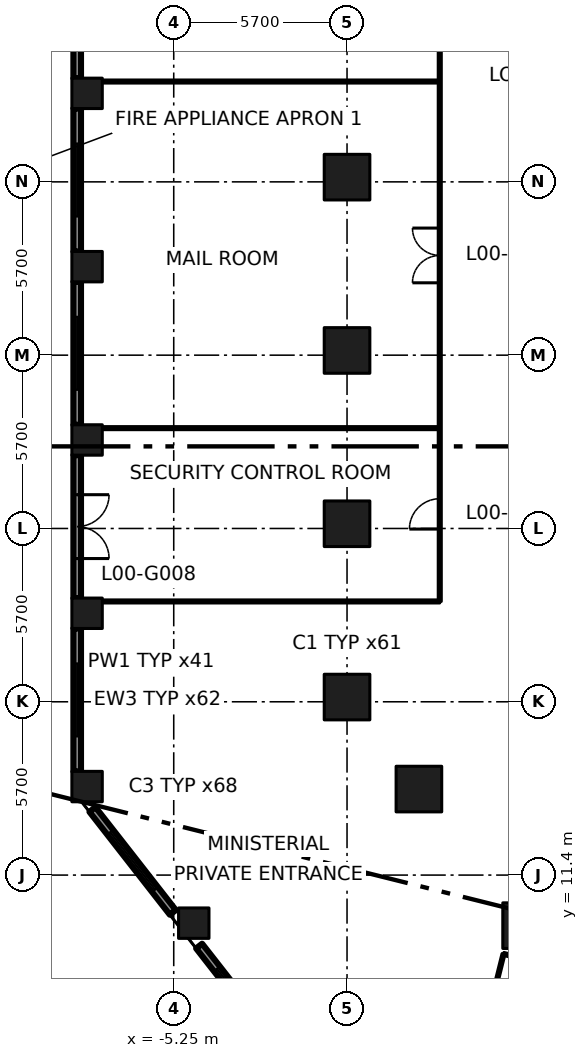
"""IFC4 building model, lengths in metres.
Left out: names, types, materials, properties, quantities, classifications, styles, units other than length and angle.
Written with IfcOpenShell. Run it as: python <this file> out.ifc"""

import sys

from ifc_helpers import new_model, si_unit, direction, frame, frame_2d, origin, origin_2d, place, context, subcontext, project, spatial, rectangle, extrude, element, fill, save


model = new_model("IFC4")
c1 = context("Model", 3, precision=1e-05, world=origin(), true_north=direction((0.0, 1.0)))
c2 = subcontext(c1, "Body", "Model", "MODEL_VIEW")
j1 = project(units=[si_unit("LENGTHUNIT", "METRE"), si_unit("PLANEANGLEUNIT", "RADIAN")], contexts=[c1])
p1 = place(None, origin())
s1 = spatial("IfcSite", under=j1, at=p1, CompositionType="ELEMENT")
p2 = place(p1, origin())
s2 = spatial("IfcBuilding", under=s1, at=p2, CompositionType="ELEMENT")
p3 = place(p2, origin())
s3 = spatial("IfcBuildingStorey", under=s2, at=p3, CompositionType="ELEMENT", Elevation=0.0)
for number, where, z_axis, x_axis in (
    (1, (0.45, 17.255, 0.0), (0.0, 0.0, 1.0), (1.0, 0.0, 0.0)),
    (2, (0.45, 22.955, 0.0), (0.0, 0.0, 1.0), (1.0, 0.0, 0.0)),
    (3, (0.45, 28.655, 0.0), (0.0, 0.0, 1.0), (1.0, 0.0, 0.0)),
    (4, (0.45, 34.355, 0.0), (0.0, 0.0, 1.0), (1.0, 0.0, 0.0)),
    (5, (6.323, 9.737, 0.0), (0.0, 0.0, 1.0), (1.0, 0.0, 0.0)),
    (6, (2.814, 14.229, 0.0), (0.0, 0.0, 1.0), (1.0, 0.0, 0.0)),
):
    element("IfcColumn", number, at=place(p3, frame(where, z_axis=z_axis, x_axis=x_axis)), inside=s3, PredefinedType="COLUMN", context=c2, shape_type="SweptSolid", body=[
        extrude(rectangle(XDim=1.5, YDim=1.5, at=origin_2d()), origin(), (0.0, 0.0, 1.0), 7.2),
    ])
for number, where, z_axis, x_axis in (
    (7, (-8.1, 14.311, 0.0), (0.0, 0.0, 1.0), (1.0, 0.0, 0.0)),
    (8, (-8.1, 20.011, 0.0), (0.0, 0.0, 1.0), (1.0, 0.0, 0.0)),
    (9, (-8.1, 25.711, 0.0), (0.0, 0.0, 1.0), (1.0, 0.0, 0.0)),
    (10, (-8.1, 31.411, 0.0), (0.0, 0.0, 1.0), (1.0, 0.0, 0.0)),
    (11, (-8.1, 37.111, 0.0), (0.0, 0.0, 1.0), (1.0, 0.0, 0.0)),
    (12, (-4.591, 9.819, 0.0), (0.0, 0.0, 1.0), (1.0, 0.0, 0.0)),
):
    element("IfcColumn", number, at=place(p3, frame(where, z_axis=z_axis, x_axis=x_axis)), inside=s3, PredefinedType="COLUMN", context=c2, shape_type="SweptSolid", body=[
        extrude(rectangle(XDim=1.0, YDim=1.0, at=origin_2d()), origin(), (0.0, 0.0, 1.0), 7.2),
    ])
p4 = place(p3, frame((3.263, -0.557, 0.0), z_axis=(0.0, 0.0, 1.0), x_axis=(0.241845159871, 0.970314855419, 0.0)))
e13 = element("IfcWall", 13, at=p4, inside=s3, PredefinedType="PARTITIONING", context=c2, shape_type="SweptSolid", body=[
    extrude(rectangle(XDim=9.652, YDim=0.1, at=frame_2d((4.826, 0.0))), origin(), (0.0, 0.0, 1.0), 6.75),
])
p5 = place(p4, frame((4.443, 0.0, 0.0)))
e14 = element("IfcOpeningElement", 14, at=p5, cuts=e13, PredefinedType="OPENING", context=c2, shape_type="SweptSolid", body=[
    extrude(rectangle(XDim=1.0, YDim=2.1, at=frame_2d((0.5, 1.05))), frame((0.0, 0.06, 0.0), z_axis=(0.0, -1.0, 0.0), x_axis=(1.0, 0.0, 0.0)), (0.0, 0.0, 1.0), 0.12),
])
p6 = place(p3, frame((3.5, 20.4, 0.0), z_axis=(0.0, 0.0, 1.0), x_axis=(0.0, 1.0, 0.0)))
e15 = element("IfcWall", 15, at=p6, inside=s3, PredefinedType="PARTITIONING", context=c2, shape_type="SweptSolid", body=[
    extrude(rectangle(XDim=21.0, YDim=0.1, at=frame_2d((10.5, 0.0))), origin(), (0.0, 0.0, 1.0), 6.75),
])
p7 = place(p6, frame((2.38, 0.0, 0.0)))
e16 = element("IfcOpeningElement", 16, at=p7, cuts=e15, PredefinedType="OPENING", context=c2, shape_type="SweptSolid", body=[
    extrude(rectangle(XDim=1.0, YDim=2.1, at=frame_2d((0.5, 1.05))), frame((0.0, 0.06, 0.0), z_axis=(0.0, -1.0, 0.0), x_axis=(1.0, 0.0, 0.0)), (0.0, 0.0, 1.0), 0.12),
])
p8 = place(p6, frame((10.48, 0.0, 0.0)))
e17 = element("IfcOpeningElement", 17, at=p8, cuts=e15, PredefinedType="OPENING", context=c2, shape_type="SweptSolid", body=[
    extrude(rectangle(XDim=1.8, YDim=2.1, at=frame_2d((0.9, 1.05))), frame((0.0, 0.06, 0.0), z_axis=(0.0, -1.0, 0.0), x_axis=(1.0, 0.0, 0.0)), (0.0, 0.0, 1.0), 0.12),
])
p9 = place(p3, frame((3.5, 20.4, 0.0), z_axis=(0.0, 0.0, 1.0), x_axis=(-1.0, 0.0, 0.0)))
e18 = element("IfcWall", 18, at=p9, inside=s3, PredefinedType="PARTITIONING", context=c2, shape_type="SweptSolid", body=[
    extrude(rectangle(XDim=11.08, YDim=0.1, at=frame_2d((5.54, 0.0))), origin(), (0.0, 0.0, 1.0), 6.75),
])
p10 = place(p3, frame((5.597, 8.808, 0.0), z_axis=(0.0, 0.0, 1.0), x_axis=(0.97028530919, -0.241963672417, 0.0)))
e19 = element("IfcWall", 19, at=p10, inside=s3, PredefinedType="PARTITIONING", context=c2, shape_type="SweptSolid", body=[
    extrude(rectangle(XDim=13.56, YDim=0.1, at=frame_2d((6.78, 0.0))), origin(), (0.0, 0.0, 1.0), 6.75),
])
p11 = place(p10, frame((5.88, 0.0, 0.0)))
e20 = element("IfcOpeningElement", 20, at=p11, cuts=e19, PredefinedType="OPENING", context=c2, shape_type="SweptSolid", body=[
    extrude(rectangle(XDim=1.8, YDim=2.1, at=frame_2d((0.9, 1.05))), frame((0.0, 0.06, 0.0), z_axis=(0.0, -1.0, 0.0), x_axis=(1.0, 0.0, 0.0)), (0.0, 0.0, 1.0), 0.12),
])
for number, where, z_axis, x_axis in (
    (21, (3.45, 26.1, 0.0), (0.0, 0.0, 1.0), (-1.0, 0.0, 0.0)),
    (22, (3.45, 37.5, 0.0), (0.0, 0.0, 1.0), (-1.0, 0.0, 0.0)),
):
    element("IfcWall", number, at=place(p3, frame(where, z_axis=z_axis, x_axis=x_axis)), inside=s3, PredefinedType="PARTITIONING", context=c2, shape_type="SweptSolid", body=[
        extrude(rectangle(XDim=11.03, YDim=0.1, at=frame_2d((5.515, 0.0))), origin(), (0.0, 0.0, 1.0), 6.75),
    ])
p12 = place(p3, frame((-8.425, 42.311, 0.0), z_axis=(0.0, 0.0, 1.0), x_axis=(0.0, -1.0, 0.0)))
e23 = element("IfcWall", 23, at=p12, inside=s3, PredefinedType="SOLIDWALL", context=c2, shape_type="SweptSolid", body=[
    extrude(rectangle(XDim=4.7, YDim=0.25, at=frame_2d((2.35, 0.0))), origin(), (0.0, 0.0, 1.0), 5.85),
])
p13 = place(p12, frame((1.15, 0.0, 0.9)))
e24 = element("IfcOpeningElement", 24, at=p13, cuts=e23, PredefinedType="OPENING", context=c2, shape_type="SweptSolid", body=[
    extrude(rectangle(XDim=2.4, YDim=4.5, at=frame_2d((1.2, 2.25))), frame((0.0, 0.135, 0.0), z_axis=(0.0, -1.0, 0.0), x_axis=(1.0, 0.0, 0.0)), (0.0, 0.0, 1.0), 0.27),
])
p14 = place(p3, frame((-8.425, 36.611, 0.0), z_axis=(0.0, 0.0, 1.0), x_axis=(0.0, -1.0, 0.0)))
e25 = element("IfcWall", 25, at=p14, inside=s3, PredefinedType="SOLIDWALL", context=c2, shape_type="SweptSolid", body=[
    extrude(rectangle(XDim=4.7, YDim=0.25, at=frame_2d((2.35, 0.0))), origin(), (0.0, 0.0, 1.0), 5.85),
])
p15 = place(p14, frame((1.15, 0.0, 0.9)))
e26 = element("IfcOpeningElement", 26, at=p15, cuts=e25, PredefinedType="OPENING", context=c2, shape_type="SweptSolid", body=[
    extrude(rectangle(XDim=2.4, YDim=4.5, at=frame_2d((1.2, 2.25))), frame((0.0, 0.135, 0.0), z_axis=(0.0, -1.0, 0.0), x_axis=(1.0, 0.0, 0.0)), (0.0, 0.0, 1.0), 0.27),
])
p16 = place(p3, frame((-8.425, 30.911, 0.0), z_axis=(0.0, 0.0, 1.0), x_axis=(0.0, -1.0, 0.0)))
e27 = element("IfcWall", 27, at=p16, inside=s3, PredefinedType="SOLIDWALL", context=c2, shape_type="SweptSolid", body=[
    extrude(rectangle(XDim=4.7, YDim=0.25, at=frame_2d((2.35, 0.0))), origin(), (0.0, 0.0, 1.0), 5.85),
])
p17 = place(p16, frame((1.15, 0.0, 0.9)))
e28 = element("IfcOpeningElement", 28, at=p17, cuts=e27, PredefinedType="OPENING", context=c2, shape_type="SweptSolid", body=[
    extrude(rectangle(XDim=2.4, YDim=4.5, at=frame_2d((1.2, 2.25))), frame((0.0, 0.135, 0.0), z_axis=(0.0, -1.0, 0.0), x_axis=(1.0, 0.0, 0.0)), (0.0, 0.0, 1.0), 0.27),
])
p18 = place(p3, frame((-8.425, 25.211, 0.0), z_axis=(0.0, 0.0, 1.0), x_axis=(0.0, -1.0, 0.0)))
e29 = element("IfcWall", 29, at=p18, inside=s3, PredefinedType="SOLIDWALL", context=c2, shape_type="SweptSolid", body=[
    extrude(rectangle(XDim=4.7, YDim=0.25, at=frame_2d((2.35, 0.0))), origin(), (0.0, 0.0, 1.0), 5.85),
])
p19 = place(p18, frame((1.3, 0.0, 0.0)))
e30 = element("IfcOpeningElement", 30, at=p19, cuts=e29, PredefinedType="OPENING", context=c2, shape_type="SweptSolid", body=[
    extrude(rectangle(XDim=2.1, YDim=2.4, at=frame_2d((1.05, 1.2))), frame((0.0, 0.135, 0.0), z_axis=(0.0, -1.0, 0.0), x_axis=(1.0, 0.0, 0.0)), (0.0, 0.0, 1.0), 0.27),
])
p20 = place(p3, frame((-8.425, 19.511, 0.0), z_axis=(0.0, 0.0, 1.0), x_axis=(0.0, -1.0, 0.0)))
e31 = element("IfcWall", 31, at=p20, inside=s3, PredefinedType="SOLIDWALL", context=c2, shape_type="SweptSolid", body=[
    extrude(rectangle(XDim=4.7, YDim=0.25, at=frame_2d((2.35, 0.0))), origin(), (0.0, 0.0, 1.0), 5.85),
])
p21 = place(p20, frame((1.15, 0.0, 0.9)))
e32 = element("IfcOpeningElement", 32, at=p21, cuts=e31, PredefinedType="OPENING", context=c2, shape_type="SweptSolid", body=[
    extrude(rectangle(XDim=2.4, YDim=4.5, at=frame_2d((1.2, 2.25))), frame((0.0, 0.135, 0.0), z_axis=(0.0, -1.0, 0.0), x_axis=(1.0, 0.0, 0.0)), (0.0, 0.0, 1.0), 0.27),
])
p22 = place(p3, frame((-7.924, 13.558, 0.0), z_axis=(0.0, 0.0, 1.0), x_axis=(0.615603242749, -0.788056246417, 0.0)))
e33 = element("IfcWall", 33, at=p22, inside=s3, PredefinedType="SOLIDWALL", context=c2, shape_type="SweptSolid", body=[
    extrude(rectangle(XDim=4.297, YDim=0.25, at=frame_2d((2.148, 0.0))), origin(), (0.0, 0.0, 1.0), 5.85),
])
p23 = place(p22, frame((0.948, 0.0, 0.9)))
e34 = element("IfcOpeningElement", 34, at=p23, cuts=e33, PredefinedType="OPENING", context=c2, shape_type="SweptSolid", body=[
    extrude(rectangle(XDim=2.4, YDim=4.5, at=frame_2d((1.2, 2.25))), frame((0.0, 0.135, 0.0), z_axis=(0.0, -1.0, 0.0), x_axis=(1.0, 0.0, 0.0)), (0.0, 0.0, 1.0), 0.27),
])
p24 = place(p3, frame((-4.415, 9.066, 0.0), z_axis=(0.0, 0.0, 1.0), x_axis=(0.615713519567, -0.787970089421, 0.0)))
e35 = element("IfcWall", 35, at=p24, inside=s3, PredefinedType="SOLIDWALL", context=c2, shape_type="SweptSolid", body=[
    extrude(rectangle(XDim=4.296, YDim=0.25, at=frame_2d((2.148, 0.0))), origin(), (0.0, 0.0, 1.0), 5.85),
])
p25 = place(p24, frame((0.948, 0.0, 0.9)))
e36 = element("IfcOpeningElement", 36, at=p25, cuts=e35, PredefinedType="OPENING", context=c2, shape_type="SweptSolid", body=[
    extrude(rectangle(XDim=2.4, YDim=4.5, at=frame_2d((1.2, 2.25))), frame((0.0, 0.135, 0.0), z_axis=(0.0, -1.0, 0.0), x_axis=(1.0, 0.0, 0.0)), (0.0, 0.0, 1.0), 0.27),
])
p26 = place(p7, origin())
e37 = element("IfcDoor", 37, at=p26, inside=s3, OperationType="SINGLE_SWING_LEFT", PredefinedType="DOOR", context=c2, shape_type="SweptSolid", body=[
    extrude(rectangle(XDim=1.0, YDim=2.1, at=frame_2d((0.5, 1.05))), frame((0.0, 0.025, 0.0), z_axis=(0.0, -1.0, 0.0), x_axis=(1.0, 0.0, 0.0)), (0.0, 0.0, 1.0), 0.05),
])
fill(e16, e37)
p27 = place(p8, origin())
e38 = element("IfcDoor", 38, at=p27, inside=s3, OperationType="DOUBLE_DOOR_SINGLE_SWING", PredefinedType="DOOR", context=c2, shape_type="SweptSolid", body=[
    extrude(rectangle(XDim=1.8, YDim=2.1, at=frame_2d((0.9, 1.05))), frame((0.0, 0.025, 0.0), z_axis=(0.0, -1.0, 0.0), x_axis=(1.0, 0.0, 0.0)), (0.0, 0.0, 1.0), 0.05),
])
fill(e17, e38)
p28 = place(p15, origin())
e39 = element("IfcWindow", 39, at=p28, inside=s3, PartitioningType="DOUBLE_PANEL_VERTICAL", PredefinedType="WINDOW", context=c2, shape_type="SweptSolid", body=[
    extrude(rectangle(XDim=2.4, YDim=4.5, at=frame_2d((1.2, 2.25))), frame((0.0, 0.03, 0.0), z_axis=(0.0, -1.0, 0.0), x_axis=(1.0, 0.0, 0.0)), (0.0, 0.0, 1.0), 0.06),
])
fill(e26, e39)
p29 = place(p17, origin())
e40 = element("IfcWindow", 40, at=p29, inside=s3, PartitioningType="DOUBLE_PANEL_VERTICAL", PredefinedType="WINDOW", context=c2, shape_type="SweptSolid", body=[
    extrude(rectangle(XDim=2.4, YDim=4.5, at=frame_2d((1.2, 2.25))), frame((0.0, 0.03, 0.0), z_axis=(0.0, -1.0, 0.0), x_axis=(1.0, 0.0, 0.0)), (0.0, 0.0, 1.0), 0.06),
])
fill(e28, e40)
p30 = place(p19, origin())
e41 = element("IfcDoor", 41, at=p30, inside=s3, OperationType="DOUBLE_DOOR_DOUBLE_SWING", PredefinedType="DOOR", context=c2, shape_type="SweptSolid", body=[
    extrude(rectangle(XDim=2.1, YDim=2.4, at=frame_2d((1.05, 1.2))), frame((0.0, 0.025, 0.0), z_axis=(0.0, -1.0, 0.0), x_axis=(1.0, 0.0, 0.0)), (0.0, 0.0, 1.0), 0.05),
])
fill(e30, e41)
p31 = place(p21, origin())
e42 = element("IfcWindow", 42, at=p31, inside=s3, PartitioningType="DOUBLE_PANEL_VERTICAL", PredefinedType="WINDOW", context=c2, shape_type="SweptSolid", body=[
    extrude(rectangle(XDim=2.4, YDim=4.5, at=frame_2d((1.2, 2.25))), frame((0.0, 0.03, 0.0), z_axis=(0.0, -1.0, 0.0), x_axis=(1.0, 0.0, 0.0)), (0.0, 0.0, 1.0), 0.06),
])
fill(e32, e42)
p32 = place(p23, origin())
e43 = element("IfcWindow", 43, at=p32, inside=s3, PartitioningType="DOUBLE_PANEL_VERTICAL", PredefinedType="WINDOW", context=c2, shape_type="SweptSolid", body=[
    extrude(rectangle(XDim=2.4, YDim=4.5, at=frame_2d((1.2, 2.25))), frame((0.0, 0.03, 0.0), z_axis=(0.0, -1.0, 0.0), x_axis=(1.0, 0.0, 0.0)), (0.0, 0.0, 1.0), 0.06),
])
fill(e34, e43)
p33 = place(p25, origin())
e44 = element("IfcWindow", 44, at=p33, inside=s3, PartitioningType="DOUBLE_PANEL_VERTICAL", PredefinedType="WINDOW", context=c2, shape_type="SweptSolid", body=[
    extrude(rectangle(XDim=2.4, YDim=4.5, at=frame_2d((1.2, 2.25))), frame((0.0, 0.03, 0.0), z_axis=(0.0, -1.0, 0.0), x_axis=(1.0, 0.0, 0.0)), (0.0, 0.0, 1.0), 0.06),
])
fill(e36, e44)
save(model, sys.argv[1])
